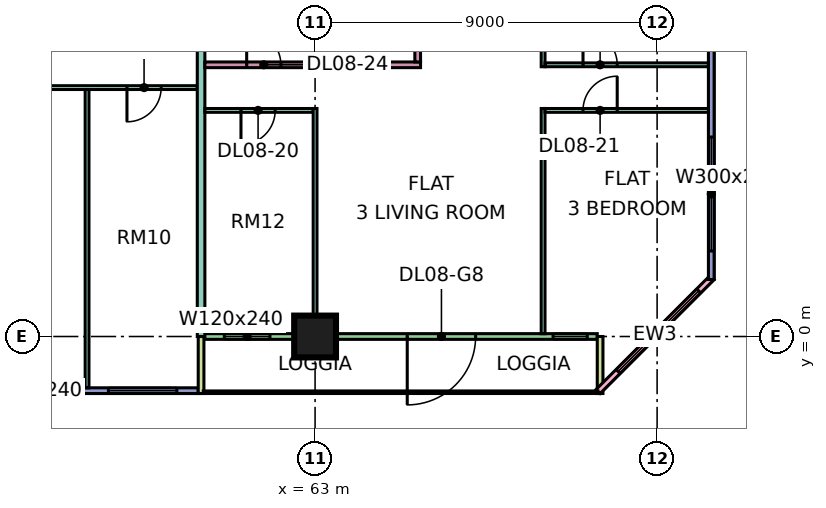
"""IFC4 building model, lengths in metres.
Left out: names, types, materials, properties, quantities, classifications, styles, units other than length and angle.
Written with IfcOpenShell. Run it as: python <this file> out.ifc"""

import sys

from ifc_helpers import new_model, si_unit, direction, frame, frame_2d, origin, origin_2d, place, context, subcontext, project, spatial, rectangle, extrude, element, fill, save


model = new_model("IFC4")
c1 = context("Model", 3, precision=1e-05, world=origin(), true_north=direction((0.0, 1.0)))
c2 = subcontext(c1, "Body", "Model", "MODEL_VIEW")
j1 = project(units=[si_unit("LENGTHUNIT", "METRE"), si_unit("PLANEANGLEUNIT", "RADIAN")], contexts=[c1])
p1 = place(None, origin())
s1 = spatial("IfcSite", under=j1, at=p1, CompositionType="ELEMENT")
p2 = place(p1, origin())
s2 = spatial("IfcBuilding", under=s1, at=p2, CompositionType="ELEMENT")
p3 = place(p2, frame((0.0, 0.0, 45.15)))
s3 = spatial("IfcBuildingStorey", under=s2, at=p3, CompositionType="ELEMENT", Elevation=45.15)
p4 = place(p3, frame((63.0, 0.0, 0.0), z_axis=(0.0, 0.0, 1.0), x_axis=(1.0, 0.0, 0.0)))
e1 = element("IfcColumn", 1, at=p4, inside=s3, PredefinedType="COLUMN", context=c2, shape_type="SweptSolid", body=[
    extrude(rectangle(XDim=1.1, YDim=1.1, at=origin_2d()), origin(), (0.0, 0.0, 1.0), 3.75),
])
p5 = place(p3, frame((48.075, -1.425, 0.0), z_axis=(0.0, 0.0, 1.0), x_axis=(1.0, 0.0, 0.0)))
e2 = element("IfcWall", 2, at=p5, inside=s3, PredefinedType="SOLIDWALL", context=c2, shape_type="SweptSolid", body=[
    extrude(rectangle(XDim=11.85, YDim=0.15, at=frame_2d((5.925, 0.0))), origin(), (0.0, 0.0, 1.0), 3.35),
])
p6 = place(p5, frame((0.562, 0.0, 0.45)))
e3 = element("IfcOpeningElement", 3, at=p6, cuts=e2, PredefinedType="OPENING", context=c2, shape_type="SweptSolid", body=[
    extrude(rectangle(XDim=1.8, YDim=2.4, at=frame_2d((0.9, 1.2))), frame((0.0, 0.085, 0.0), z_axis=(0.0, -1.0, 0.0), x_axis=(1.0, 0.0, 0.0)), (0.0, 0.0, 1.0), 0.17),
])
p7 = place(p5, frame((3.525, 0.0, 0.45)))
e4 = element("IfcOpeningElement", 4, at=p7, cuts=e2, PredefinedType="OPENING", context=c2, shape_type="SweptSolid", body=[
    extrude(rectangle(XDim=1.8, YDim=2.4, at=frame_2d((0.9, 1.2))), frame((0.0, 0.085, 0.0), z_axis=(0.0, -1.0, 0.0), x_axis=(1.0, 0.0, 0.0)), (0.0, 0.0, 1.0), 0.17),
])
p8 = place(p5, frame((6.525, 0.0, 0.45)))
e5 = element("IfcOpeningElement", 5, at=p8, cuts=e2, PredefinedType="OPENING", context=c2, shape_type="SweptSolid", body=[
    extrude(rectangle(XDim=1.8, YDim=2.4, at=frame_2d((0.9, 1.2))), frame((0.0, 0.085, 0.0), z_axis=(0.0, -1.0, 0.0), x_axis=(1.0, 0.0, 0.0)), (0.0, 0.0, 1.0), 0.17),
])
p9 = place(p5, frame((9.488, 0.0, 0.45)))
e6 = element("IfcOpeningElement", 6, at=p9, cuts=e2, PredefinedType="OPENING", context=c2, shape_type="SweptSolid", body=[
    extrude(rectangle(XDim=1.8, YDim=2.4, at=frame_2d((0.9, 1.2))), frame((0.0, 0.085, 0.0), z_axis=(0.0, -1.0, 0.0), x_axis=(1.0, 0.0, 0.0)), (0.0, 0.0, 1.0), 0.17),
])
p10 = place(p3, frame((60.075, 0.0, 0.0), z_axis=(0.0, 0.0, 1.0), x_axis=(1.0, 0.0, 0.0)))
e7 = element("IfcWall", 7, at=p10, inside=s3, PredefinedType="SOLIDWALL", context=c2, shape_type="SweptSolid", body=[
    extrude(rectangle(XDim=10.35, YDim=0.15, at=frame_2d((5.175, 0.0))), origin(), (0.0, 0.0, 1.0), 3.35),
])
p11 = place(p10, frame((0.538, 0.0, 0.45)))
e8 = element("IfcOpeningElement", 8, at=p11, cuts=e7, PredefinedType="OPENING", context=c2, shape_type="SweptSolid", body=[
    extrude(rectangle(XDim=1.2, YDim=2.4, at=frame_2d((0.6, 1.2))), frame((0.0, 0.085, 0.0), z_axis=(0.0, -1.0, 0.0), x_axis=(1.0, 0.0, 0.0)), (0.0, 0.0, 1.0), 0.17),
])
p12 = place(p10, frame((5.35, 0.0, 0.0)))
e9 = element("IfcOpeningElement", 9, at=p12, cuts=e7, PredefinedType="OPENING", context=c2, shape_type="SweptSolid", body=[
    extrude(rectangle(XDim=1.8, YDim=2.4, at=frame_2d((0.9, 1.2))), frame((0.0, 0.085, 0.0), z_axis=(0.0, -1.0, 0.0), x_axis=(1.0, 0.0, 0.0)), (0.0, 0.0, 1.0), 0.17),
])
p13 = place(p10, frame((9.188, 0.0, 0.45)))
e10 = element("IfcOpeningElement", 10, at=p13, cuts=e7, PredefinedType="OPENING", context=c2, shape_type="SweptSolid", body=[
    extrude(rectangle(XDim=0.9, YDim=2.4, at=frame_2d((0.45, 1.2))), frame((0.0, 0.085, 0.0), z_axis=(0.0, -1.0, 0.0), x_axis=(1.0, 0.0, 0.0)), (0.0, 0.0, 1.0), 0.17),
])
for number, where, z_axis, x_axis in (
    (11, (60.0, -1.5, 0.0), (0.0, 0.0, 1.0), (0.0, 1.0, 0.0)),
    (12, (70.5, -1.5, 0.0), (0.0, 0.0, 1.0), (0.0, 1.0, 0.0)),
):
    element("IfcWall", number, at=place(p3, frame(where, z_axis=z_axis, x_axis=x_axis)), inside=s3, PredefinedType="SOLIDWALL", context=c2, shape_type="SweptSolid", body=[
        extrude(rectangle(XDim=1.5, YDim=0.15, at=frame_2d((0.75, 0.0))), origin(), (0.0, 0.0, 1.0), 3.35),
    ])
p14 = place(p3, frame((70.447, -1.447, 0.0), z_axis=(0.0, 0.0, 1.0), x_axis=(0.707106781187, 0.707106781187, 0.0)))
e13 = element("IfcWall", 13, at=p14, inside=s3, PredefinedType="SOLIDWALL", context=c2, shape_type="SweptSolid", body=[
    extrude(rectangle(XDim=4.243, YDim=0.15, at=frame_2d((2.121, 0.0))), origin(), (0.0, 0.0, 1.0), 3.35),
])
p15 = place(p14, frame((0.744, 0.0, 0.45)))
e14 = element("IfcOpeningElement", 14, at=p15, cuts=e13, PredefinedType="OPENING", context=c2, shape_type="SweptSolid", body=[
    extrude(rectangle(XDim=3.0, YDim=2.4, at=frame_2d((1.5, 1.2))), frame((0.0, 0.085, 0.0), z_axis=(0.0, -1.0, 0.0), x_axis=(1.0, 0.0, 0.0)), (0.0, 0.0, 1.0), 0.17),
])
p16 = place(p3, frame((73.425, 1.5, 0.0), z_axis=(0.0, 0.0, 1.0), x_axis=(0.0, 1.0, 0.0)))
e15 = element("IfcWall", 15, at=p16, inside=s3, PredefinedType="SOLIDWALL", context=c2, shape_type="SweptSolid", body=[
    extrude(rectangle(XDim=10.425, YDim=0.15, at=frame_2d((5.212, 0.0))), origin(), (0.0, 0.0, 1.0), 3.35),
])
p17 = place(p16, frame((0.75, 0.0, 0.45)))
e16 = element("IfcOpeningElement", 16, at=p17, cuts=e15, PredefinedType="OPENING", context=c2, shape_type="SweptSolid", body=[
    extrude(rectangle(XDim=3.0, YDim=2.4, at=frame_2d((1.5, 1.2))), frame((0.0, 0.085, 0.0), z_axis=(0.0, -1.0, 0.0), x_axis=(1.0, 0.0, 0.0)), (0.0, 0.0, 1.0), 0.17),
])
p18 = place(p3, frame((54.05, 6.55, 0.0), z_axis=(0.0, 0.0, 1.0), x_axis=(1.0, 0.0, 0.0)))
e17 = element("IfcWall", 17, at=p18, inside=s3, PredefinedType="PARTITIONING", context=c2, shape_type="SweptSolid", body=[
    extrude(rectangle(XDim=5.85, YDim=0.1, at=frame_2d((2.925, 0.0))), origin(), (0.0, 0.0, 1.0), 3.35),
])
p19 = place(p18, frame((1.0, 0.0, 0.0)))
e18 = element("IfcOpeningElement", 18, at=p19, cuts=e17, PredefinedType="OPENING", context=c2, shape_type="SweptSolid", body=[
    extrude(rectangle(XDim=0.9, YDim=2.1, at=frame_2d((0.45, 1.05))), frame((0.0, 0.06, 0.0), z_axis=(0.0, -1.0, 0.0), x_axis=(1.0, 0.0, 0.0)), (0.0, 0.0, 1.0), 0.12),
])
p20 = place(p18, frame((4.0, 0.0, 0.0)))
e19 = element("IfcOpeningElement", 19, at=p20, cuts=e17, PredefinedType="OPENING", context=c2, shape_type="SweptSolid", body=[
    extrude(rectangle(XDim=0.9, YDim=2.1, at=frame_2d((0.45, 1.05))), frame((0.0, 0.06, 0.0), z_axis=(0.0, -1.0, 0.0), x_axis=(1.0, 0.0, 0.0)), (0.0, 0.0, 1.0), 0.12),
])
p21 = place(p3, frame((57.0, -1.351, 0.0), z_axis=(0.0, 0.0, 1.0), x_axis=(0.0, 1.0, 0.0)))
e20 = element("IfcWall", 20, at=p21, inside=s3, PredefinedType="PARTITIONING", context=c2, shape_type="SweptSolid", body=[
    extrude(rectangle(XDim=7.851, YDim=0.1, at=frame_2d((3.926, 0.0))), origin(), (0.0, 0.0, 1.0), 3.35),
])
p22 = place(p3, frame((60.0, 0.0, 0.0), z_axis=(0.0, 0.0, 1.0), x_axis=(0.0, 1.0, 0.0)))
e21 = element("IfcWall", 21, at=p22, inside=s3, PredefinedType="PARTITIONING", context=c2, shape_type="SweptSolid", body=[
    extrude(rectangle(XDim=12.45, YDim=0.2, at=frame_2d((6.225, 0.0))), origin(), (0.0, 0.0, 1.0), 3.35),
])
p23 = place(p3, frame((60.1, 5.95, 0.0), z_axis=(0.0, 0.0, 1.0), x_axis=(1.0, 0.0, 0.0)))
e22 = element("IfcWall", 22, at=p23, inside=s3, PredefinedType="PARTITIONING", context=c2, shape_type="SweptSolid", body=[
    extrude(rectangle(XDim=2.85, YDim=0.1, at=frame_2d((1.425, 0.0))), origin(), (0.0, 0.0, 1.0), 3.35),
])
p24 = place(p23, frame((0.95, 0.0, 0.0)))
e23 = element("IfcOpeningElement", 23, at=p24, cuts=e22, PredefinedType="OPENING", context=c2, shape_type="SweptSolid", body=[
    extrude(rectangle(XDim=0.9, YDim=2.1, at=frame_2d((0.45, 1.05))), frame((0.0, 0.06, 0.0), z_axis=(0.0, -1.0, 0.0), x_axis=(1.0, 0.0, 0.0)), (0.0, 0.0, 1.0), 0.12),
])
p25 = place(p3, frame((60.1, 7.15, 0.0), z_axis=(0.0, 0.0, 1.0), x_axis=(1.0, 0.0, 0.0)))
e24 = element("IfcWall", 24, at=p25, inside=s3, PredefinedType="PARTITIONING", context=c2, shape_type="SweptSolid", body=[
    extrude(rectangle(XDim=5.675, YDim=0.15, at=frame_2d((2.837, 0.0))), origin(), (0.0, 0.0, 1.0), 3.35),
])
p26 = place(p25, frame((1.1, 0.0, 0.0)))
e25 = element("IfcOpeningElement", 25, at=p26, cuts=e24, PredefinedType="OPENING", context=c2, shape_type="SweptSolid", body=[
    extrude(rectangle(XDim=0.9, YDim=2.1, at=frame_2d((0.45, 1.05))), frame((0.0, 0.085, 0.0), z_axis=(0.0, -1.0, 0.0), x_axis=(1.0, 0.0, 0.0)), (0.0, 0.0, 1.0), 0.17),
])
p27 = place(p3, frame((63.0, 0.074, 0.0), z_axis=(0.0, 0.0, 1.0), x_axis=(0.0, 1.0, 0.0)))
e26 = element("IfcWall", 26, at=p27, inside=s3, PredefinedType="PARTITIONING", context=c2, shape_type="SweptSolid", body=[
    extrude(rectangle(XDim=5.926, YDim=0.1, at=frame_2d((2.963, 0.0))), origin(), (0.0, 0.0, 1.0), 3.35),
])
p28 = place(p3, frame((63.3, 7.225, 0.0), z_axis=(0.0, 0.0, 1.0), x_axis=(0.0, 1.0, 0.0)))
e27 = element("IfcWall", 27, at=p28, inside=s3, PredefinedType="PARTITIONING", context=c2, shape_type="SweptSolid", body=[
    extrude(rectangle(XDim=5.225, YDim=0.15, at=frame_2d((2.612, 0.0))), origin(), (0.0, 0.0, 1.0), 3.35),
])
p29 = place(p3, frame((65.7, 7.225, 0.0), z_axis=(0.0, 0.0, 1.0), x_axis=(0.0, 1.0, 0.0)))
e28 = element("IfcWall", 28, at=p29, inside=s3, PredefinedType="PARTITIONING", context=c2, shape_type="SweptSolid", body=[
    extrude(rectangle(XDim=5.225, YDim=0.15, at=frame_2d((2.612, 0.0))), origin(), (0.0, 0.0, 1.0), 3.35),
])
p30 = place(p29, frame((2.275, 0.0, 0.0)))
e29 = element("IfcOpeningElement", 29, at=p30, cuts=e28, PredefinedType="OPENING", context=c2, shape_type="SweptSolid", body=[
    extrude(rectangle(XDim=0.8, YDim=2.1, at=frame_2d((0.4, 1.05))), frame((0.0, 0.085, 0.0), z_axis=(0.0, -1.0, 0.0), x_axis=(1.0, 0.0, 0.0)), (0.0, 0.0, 1.0), 0.17),
])
p31 = place(p3, frame((69.0, 0.074, 0.0), z_axis=(0.0, 0.0, 1.0), x_axis=(0.0, 1.0, 0.0)))
e30 = element("IfcWall", 30, at=p31, inside=s3, PredefinedType="PARTITIONING", context=c2, shape_type="SweptSolid", body=[
    extrude(rectangle(XDim=5.926, YDim=0.1, at=frame_2d((2.963, 0.0))), origin(), (0.0, 0.0, 1.0), 3.35),
])
p32 = place(p3, frame((69.0, 7.1, 0.0), z_axis=(0.0, 0.0, 1.0), x_axis=(0.0, 1.0, 0.0)))
e31 = element("IfcWall", 31, at=p32, inside=s3, PredefinedType="PARTITIONING", context=c2, shape_type="SweptSolid", body=[
    extrude(rectangle(XDim=5.35, YDim=0.1, at=frame_2d((2.675, 0.0))), origin(), (0.0, 0.0, 1.0), 3.35),
])
p33 = place(p3, frame((69.05, 5.95, 0.0), z_axis=(0.0, 0.0, 1.0), x_axis=(1.0, 0.0, 0.0)))
e32 = element("IfcWall", 32, at=p33, inside=s3, PredefinedType="PARTITIONING", context=c2, shape_type="SweptSolid", body=[
    extrude(rectangle(XDim=4.3, YDim=0.1, at=frame_2d((2.15, 0.0))), origin(), (0.0, 0.0, 1.0), 3.35),
])
p34 = place(p33, frame((1.0, 0.0, 0.0)))
e33 = element("IfcOpeningElement", 33, at=p34, cuts=e32, PredefinedType="OPENING", context=c2, shape_type="SweptSolid", body=[
    extrude(rectangle(XDim=0.9, YDim=2.1, at=frame_2d((0.45, 1.05))), frame((0.0, 0.06, 0.0), z_axis=(0.0, -1.0, 0.0), x_axis=(1.0, 0.0, 0.0)), (0.0, 0.0, 1.0), 0.12),
])
p35 = place(p3, frame((69.05, 7.15, 0.0), z_axis=(0.0, 0.0, 1.0), x_axis=(1.0, 0.0, 0.0)))
e34 = element("IfcWall", 34, at=p35, inside=s3, PredefinedType="PARTITIONING", context=c2, shape_type="SweptSolid", body=[
    extrude(rectangle(XDim=4.3, YDim=0.1, at=frame_2d((2.15, 0.0))), origin(), (0.0, 0.0, 1.0), 3.35),
])
p36 = place(p35, frame((1.0, 0.0, 0.0)))
e35 = element("IfcOpeningElement", 35, at=p36, cuts=e34, PredefinedType="OPENING", context=c2, shape_type="SweptSolid", body=[
    extrude(rectangle(XDim=0.9, YDim=2.1, at=frame_2d((0.45, 1.05))), frame((0.0, 0.06, 0.0), z_axis=(0.0, -1.0, 0.0), x_axis=(1.0, 0.0, 0.0)), (0.0, 0.0, 1.0), 0.12),
])
p37 = place(p8, origin())
e36 = element("IfcWindow", 36, at=p37, inside=s3, PartitioningType="SINGLE_PANEL", PredefinedType="WINDOW", context=c2, shape_type="SweptSolid", body=[
    extrude(rectangle(XDim=1.8, YDim=2.4, at=frame_2d((0.9, 1.2))), frame((0.0, 0.03, 0.0), z_axis=(0.0, -1.0, 0.0), x_axis=(1.0, 0.0, 0.0)), (0.0, 0.0, 1.0), 0.06),
])
fill(e5, e36)
p38 = place(p9, origin())
e37 = element("IfcWindow", 37, at=p38, inside=s3, PartitioningType="SINGLE_PANEL", PredefinedType="WINDOW", context=c2, shape_type="SweptSolid", body=[
    extrude(rectangle(XDim=1.8, YDim=2.4, at=frame_2d((0.9, 1.2))), frame((0.0, 0.03, 0.0), z_axis=(0.0, -1.0, 0.0), x_axis=(1.0, 0.0, 0.0)), (0.0, 0.0, 1.0), 0.06),
])
fill(e6, e37)
p39 = place(p11, origin())
e38 = element("IfcWindow", 38, at=p39, inside=s3, PartitioningType="SINGLE_PANEL", PredefinedType="WINDOW", context=c2, shape_type="SweptSolid", body=[
    extrude(rectangle(XDim=1.2, YDim=2.4, at=frame_2d((0.6, 1.2))), frame((0.0, 0.03, 0.0), z_axis=(0.0, -1.0, 0.0), x_axis=(1.0, 0.0, 0.0)), (0.0, 0.0, 1.0), 0.06),
])
fill(e8, e38)
p40 = place(p12, frame((1.8, 0.0, 0.0), z_axis=(0.0, 0.0, 1.0), x_axis=(-1.0, 0.0, 0.0)))
e39 = element("IfcDoor", 39, at=p40, inside=s3, OperationType="DOUBLE_DOOR_SINGLE_SWING", PredefinedType="DOOR", context=c2, shape_type="SweptSolid", body=[
    extrude(rectangle(XDim=1.8, YDim=2.4, at=frame_2d((0.9, 1.2))), frame((0.0, 0.025, 0.0), z_axis=(0.0, -1.0, 0.0), x_axis=(1.0, 0.0, 0.0)), (0.0, 0.0, 1.0), 0.05),
])
fill(e9, e39)
p41 = place(p13, origin())
e40 = element("IfcWindow", 40, at=p41, inside=s3, PartitioningType="SINGLE_PANEL", PredefinedType="WINDOW", context=c2, shape_type="SweptSolid", body=[
    extrude(rectangle(XDim=0.9, YDim=2.4, at=frame_2d((0.45, 1.2))), frame((0.0, 0.03, 0.0), z_axis=(0.0, -1.0, 0.0), x_axis=(1.0, 0.0, 0.0)), (0.0, 0.0, 1.0), 0.06),
])
fill(e10, e40)
p42 = place(p15, origin())
e41 = element("IfcWindow", 41, at=p42, inside=s3, PartitioningType="SINGLE_PANEL", PredefinedType="WINDOW", context=c2, shape_type="SweptSolid", body=[
    extrude(rectangle(XDim=3.0, YDim=2.4, at=frame_2d((1.5, 1.2))), frame((0.0, 0.03, 0.0), z_axis=(0.0, -1.0, 0.0), x_axis=(1.0, 0.0, 0.0)), (0.0, 0.0, 1.0), 0.06),
])
fill(e14, e41)
p43 = place(p17, origin())
e42 = element("IfcWindow", 42, at=p43, inside=s3, PartitioningType="SINGLE_PANEL", PredefinedType="WINDOW", context=c2, shape_type="SweptSolid", body=[
    extrude(rectangle(XDim=3.0, YDim=2.4, at=frame_2d((1.5, 1.2))), frame((0.0, 0.03, 0.0), z_axis=(0.0, -1.0, 0.0), x_axis=(1.0, 0.0, 0.0)), (0.0, 0.0, 1.0), 0.06),
])
fill(e16, e42)
p44 = place(p20, frame((0.9, 0.0, 0.0), z_axis=(0.0, 0.0, 1.0), x_axis=(-1.0, 0.0, 0.0)))
e43 = element("IfcDoor", 43, at=p44, inside=s3, OperationType="SINGLE_SWING_LEFT", PredefinedType="DOOR", context=c2, shape_type="SweptSolid", body=[
    extrude(rectangle(XDim=0.9, YDim=2.1, at=frame_2d((0.45, 1.05))), frame((0.0, 0.025, 0.0), z_axis=(0.0, -1.0, 0.0), x_axis=(1.0, 0.0, 0.0)), (0.0, 0.0, 1.0), 0.05),
])
fill(e19, e43)
p45 = place(p24, frame((0.9, 0.0, 0.0), z_axis=(0.0, 0.0, 1.0), x_axis=(-1.0, 0.0, 0.0)))
e44 = element("IfcDoor", 44, at=p45, inside=s3, OperationType="SINGLE_SWING_LEFT", PredefinedType="DOOR", context=c2, shape_type="SweptSolid", body=[
    extrude(rectangle(XDim=0.9, YDim=2.1, at=frame_2d((0.45, 1.05))), frame((0.0, 0.025, 0.0), z_axis=(0.0, -1.0, 0.0), x_axis=(1.0, 0.0, 0.0)), (0.0, 0.0, 1.0), 0.05),
])
fill(e23, e44)
p46 = place(p34, frame((0.9, 0.0, 0.0), z_axis=(0.0, 0.0, 1.0), x_axis=(-1.0, 0.0, 0.0)))
e45 = element("IfcDoor", 45, at=p46, inside=s3, OperationType="SINGLE_SWING_RIGHT", PredefinedType="DOOR", context=c2, shape_type="SweptSolid", body=[
    extrude(rectangle(XDim=0.9, YDim=2.1, at=frame_2d((0.45, 1.05))), frame((0.0, 0.025, 0.0), z_axis=(0.0, -1.0, 0.0), x_axis=(1.0, 0.0, 0.0)), (0.0, 0.0, 1.0), 0.05),
])
fill(e33, e45)
p47 = place(p36, origin())
e46 = element("IfcDoor", 46, at=p47, inside=s3, OperationType="SINGLE_SWING_LEFT", PredefinedType="DOOR", context=c2, shape_type="SweptSolid", body=[
    extrude(rectangle(XDim=0.9, YDim=2.1, at=frame_2d((0.45, 1.05))), frame((0.0, 0.025, 0.0), z_axis=(0.0, -1.0, 0.0), x_axis=(1.0, 0.0, 0.0)), (0.0, 0.0, 1.0), 0.05),
])
fill(e35, e46)
p48 = place(p26, origin())
e47 = element("IfcDoor", 47, at=p48, inside=s3, OperationType="SINGLE_SWING_LEFT", PredefinedType="DOOR", context=c2, shape_type="SweptSolid", body=[
    extrude(rectangle(XDim=0.9, YDim=2.1, at=frame_2d((0.45, 1.05))), frame((0.0, 0.025, 0.0), z_axis=(0.0, -1.0, 0.0), x_axis=(1.0, 0.0, 0.0)), (0.0, 0.0, 1.0), 0.05),
])
fill(e25, e47)
save(model, sys.argv[1])
